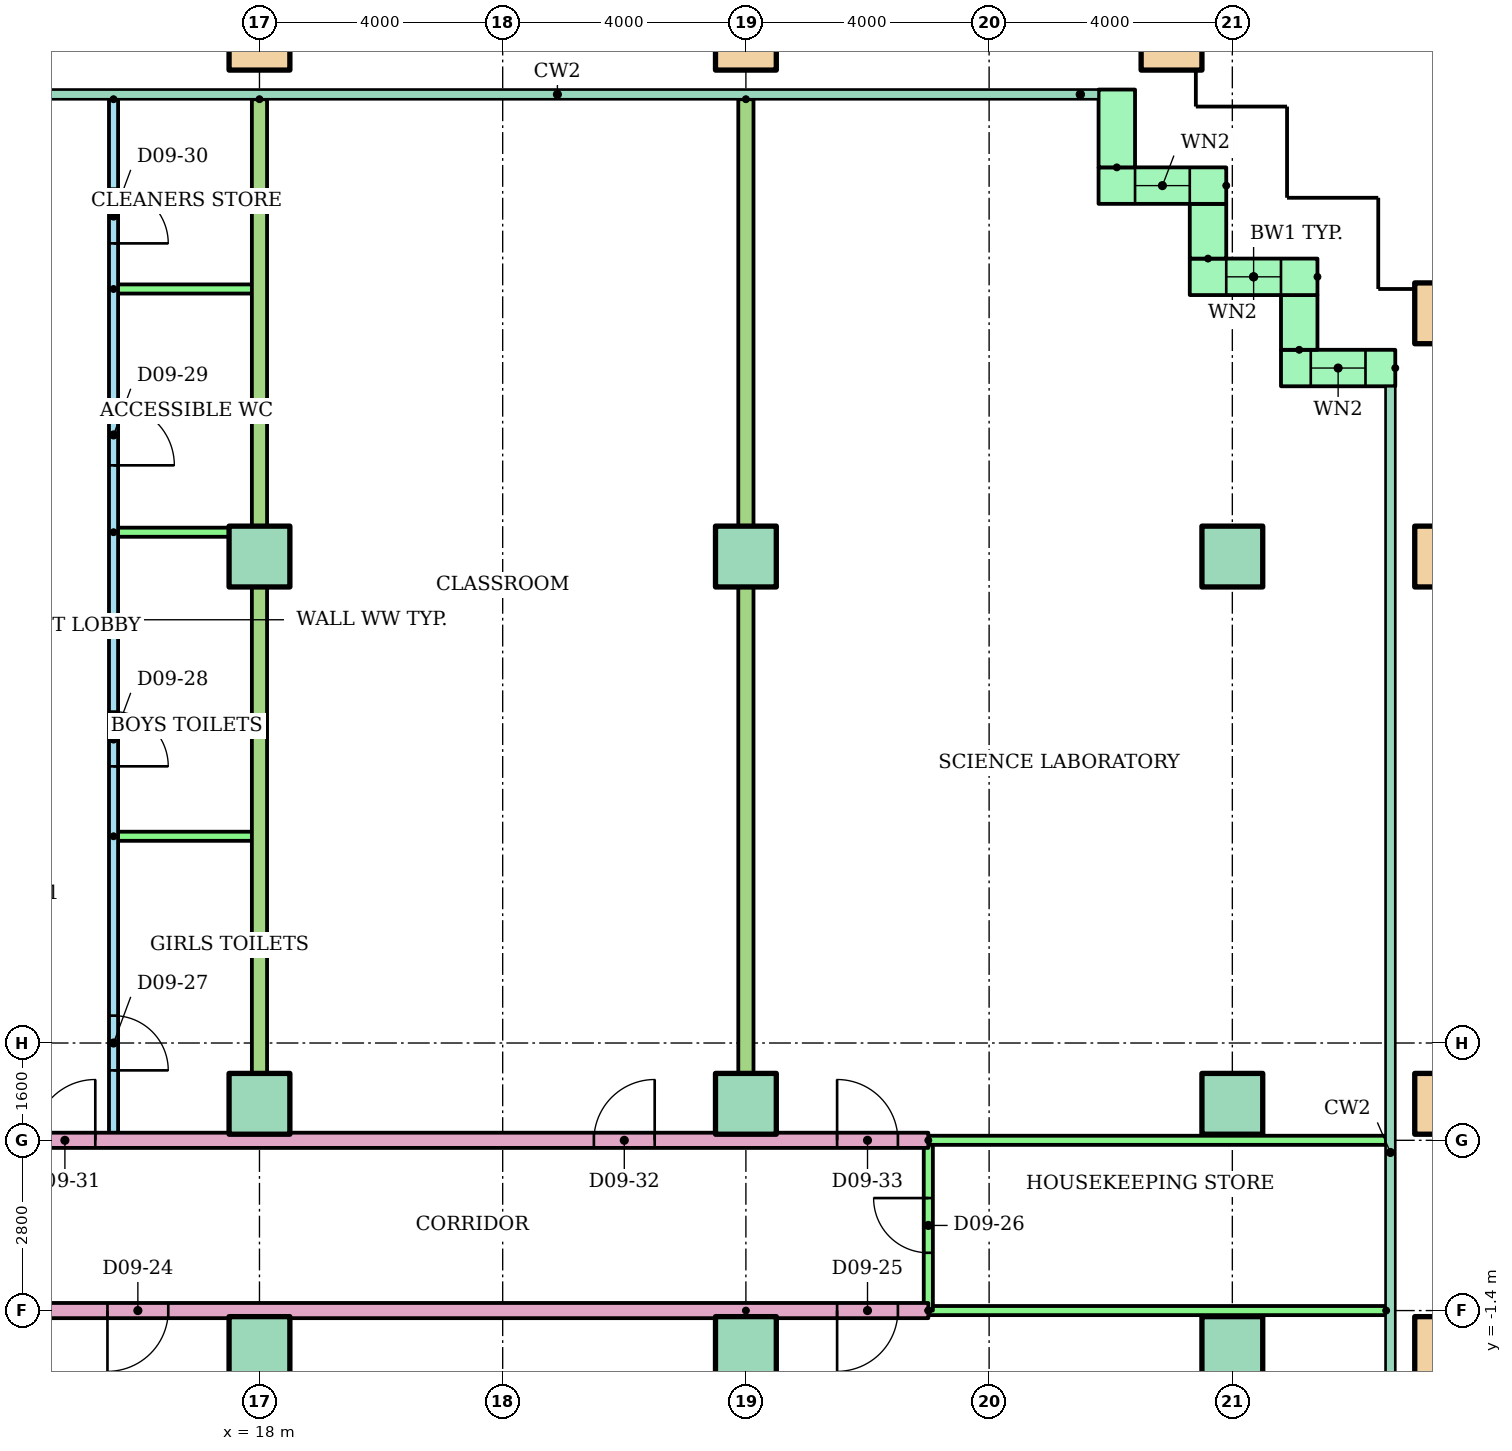
"""IFC4 building model, lengths in metres.
Left out: names, types, materials, properties, quantities, classifications, styles, units other than length and angle.
Written with IfcOpenShell. Run it as: python <this file> out.ifc"""

import sys

from ifc_helpers import new_model, si_unit, direction, frame, frame_2d, origin, origin_2d, place, context, subcontext, project, spatial, rectangle, hollow_rectangle, extrude, element, fill, save


model = new_model("IFC4")
c1 = context("Model", 3, precision=1e-05, world=origin(), true_north=direction((0.0, 1.0)))
c2 = subcontext(c1, "Body", "Model", "MODEL_VIEW")
j1 = project(units=[si_unit("LENGTHUNIT", "METRE"), si_unit("PLANEANGLEUNIT", "RADIAN")], contexts=[c1])
p1 = place(None, origin())
s1 = spatial("IfcSite", under=j1, at=p1, CompositionType="ELEMENT")
p2 = place(p1, origin())
s2 = spatial("IfcBuilding", under=s1, at=p2, CompositionType="ELEMENT")
p3 = place(p2, frame((0.0, 0.0, 37.7)))
s3 = spatial("IfcBuildingStorey", under=s2, at=p3, CompositionType="ELEMENT", Elevation=37.7)
for number, where in (
    (1, (18.0, -2.0, 0.0)),
    (2, (26.0, -2.0, 0.0)),
    (3, (34.0, -2.0, 0.0)),
):
    element("IfcColumn", number, at=place(p3, frame(where)), inside=s3, PredefinedType="COLUMN", context=c2, shape_type="SweptSolid", body=[
        extrude(rectangle(XDim=1.0, YDim=1.0, at=origin_2d()), origin(), (0.0, 0.0, 1.0), 3.9),
    ])
p4 = place(p3, frame((37.5, -2.0, 0.0)))
e4 = element("IfcColumn", 4, at=p4, inside=s3, PredefinedType="COLUMN", context=c2, shape_type="SweptSolid", body=[
    extrude(hollow_rectangle(XDim=1.0, YDim=1.0, WallThickness=0.05, at=origin_2d()), origin(), (0.0, 0.0, 1.0), 3.9),
])
for number, where in (
    (5, (18.0, 2.0, 0.0)),
    (6, (26.0, 2.0, 0.0)),
    (7, (34.0, 2.0, 0.0)),
):
    element("IfcColumn", number, at=place(p3, frame(where)), inside=s3, PredefinedType="COLUMN", context=c2, shape_type="SweptSolid", body=[
        extrude(rectangle(XDim=1.0, YDim=1.0, at=origin_2d()), origin(), (0.0, 0.0, 1.0), 3.9),
    ])
p5 = place(p3, frame((37.5, 2.0, 0.0)))
e8 = element("IfcColumn", 8, at=p5, inside=s3, PredefinedType="COLUMN", context=c2, shape_type="SweptSolid", body=[
    extrude(hollow_rectangle(XDim=1.0, YDim=1.0, WallThickness=0.05, at=origin_2d()), origin(), (0.0, 0.0, 1.0), 3.9),
])
for number, where in (
    (9, (18.0, 11.0, 0.0)),
    (10, (26.0, 11.0, 0.0)),
    (11, (34.0, 11.0, 0.0)),
):
    element("IfcColumn", number, at=place(p3, frame(where)), inside=s3, PredefinedType="COLUMN", context=c2, shape_type="SweptSolid", body=[
        extrude(rectangle(XDim=1.0, YDim=1.0, at=origin_2d()), origin(), (0.0, 0.0, 1.0), 3.9),
    ])
for number, where in (
    (12, (37.5, 11.0, 0.0)),
    (13, (37.5, 15.0, 0.0)),
    (14, (18.0, 19.5, 0.0)),
    (15, (26.0, 19.5, 0.0)),
    (16, (33.0, 19.5, 0.0)),
):
    element("IfcColumn", number, at=place(p3, frame(where)), inside=s3, PredefinedType="COLUMN", context=c2, shape_type="SweptSolid", body=[
        extrude(hollow_rectangle(XDim=1.0, YDim=1.0, WallThickness=0.05, at=origin_2d()), origin(), (0.0, 0.0, 1.0), 3.9),
    ])
p6 = place(p3, frame((36.68, 14.1, 0.0), z_axis=(0.0, 0.0, 1.0), x_axis=(-1.0, 0.0, 0.0)))
e17 = element("IfcWall", 17, at=p6, inside=s3, PredefinedType="STANDARD", context=c2, shape_type="SweptSolid", body=[
    extrude(rectangle(XDim=1.88, YDim=0.6, at=frame_2d((0.94, 0.0))), origin(), (0.0, 0.0, 1.0), 3.62),
])
p7 = place(p6, frame((0.49, 0.0, 0.9)))
e18 = element("IfcOpeningElement", 18, at=p7, cuts=e17, PredefinedType="OPENING", context=c2, shape_type="SweptSolid", body=[
    extrude(rectangle(XDim=0.9, YDim=1.8, at=frame_2d((0.45, 0.9))), frame((0.0, 0.31, 0.0), z_axis=(0.0, -1.0, 0.0), x_axis=(1.0, 0.0, 0.0)), (0.0, 0.0, 1.0), 0.62),
])
p8 = place(p3, frame((35.1, 14.4, 0.0), z_axis=(0.0, 0.0, 1.0), x_axis=(0.0, 1.0, 0.0)))
e19 = element("IfcWall", 19, at=p8, inside=s3, PredefinedType="STANDARD", context=c2, shape_type="SweptSolid", body=[
    extrude(rectangle(XDim=0.9, YDim=0.6, at=frame_2d((0.45, 0.0))), origin(), (0.0, 0.0, 1.0), 3.62),
])
p9 = place(p3, frame((35.4, 15.6, 0.0), z_axis=(0.0, 0.0, 1.0), x_axis=(-1.0, 0.0, 0.0)))
e20 = element("IfcWall", 20, at=p9, inside=s3, PredefinedType="STANDARD", context=c2, shape_type="SweptSolid", body=[
    extrude(rectangle(XDim=2.1, YDim=0.6, at=frame_2d((1.05, 0.0))), origin(), (0.0, 0.0, 1.0), 3.62),
])
p10 = place(p9, frame((0.6, 0.0, 0.9)))
e21 = element("IfcOpeningElement", 21, at=p10, cuts=e20, PredefinedType="OPENING", context=c2, shape_type="SweptSolid", body=[
    extrude(rectangle(XDim=0.9, YDim=1.8, at=frame_2d((0.45, 0.9))), frame((0.0, 0.31, 0.0), z_axis=(0.0, -1.0, 0.0), x_axis=(1.0, 0.0, 0.0)), (0.0, 0.0, 1.0), 0.62),
])
p11 = place(p3, frame((33.6, 15.9, 0.0), z_axis=(0.0, 0.0, 1.0), x_axis=(0.0, 1.0, 0.0)))
e22 = element("IfcWall", 22, at=p11, inside=s3, PredefinedType="STANDARD", context=c2, shape_type="SweptSolid", body=[
    extrude(rectangle(XDim=0.9, YDim=0.6, at=frame_2d((0.45, 0.0))), origin(), (0.0, 0.0, 1.0), 3.62),
])
p12 = place(p3, frame((33.9, 17.1, 0.0), z_axis=(0.0, 0.0, 1.0), x_axis=(-1.0, 0.0, 0.0)))
e23 = element("IfcWall", 23, at=p12, inside=s3, PredefinedType="STANDARD", context=c2, shape_type="SweptSolid", body=[
    extrude(rectangle(XDim=2.1, YDim=0.6, at=frame_2d((1.05, 0.0))), origin(), (0.0, 0.0, 1.0), 3.62),
])
p13 = place(p12, frame((0.6, 0.0, 0.9)))
e24 = element("IfcOpeningElement", 24, at=p13, cuts=e23, PredefinedType="OPENING", context=c2, shape_type="SweptSolid", body=[
    extrude(rectangle(XDim=0.9, YDim=1.8, at=frame_2d((0.45, 0.9))), frame((0.0, 0.31, 0.0), z_axis=(0.0, -1.0, 0.0), x_axis=(1.0, 0.0, 0.0)), (0.0, 0.0, 1.0), 0.62),
])
p14 = place(p3, frame((32.1, 17.4, 0.0), z_axis=(0.0, 0.0, 1.0), x_axis=(0.0, 1.0, 0.0)))
e25 = element("IfcWall", 25, at=p14, inside=s3, PredefinedType="STANDARD", context=c2, shape_type="SweptSolid", body=[
    extrude(rectangle(XDim=1.28, YDim=0.6, at=frame_2d((0.64, 0.0))), origin(), (0.0, 0.0, 1.0), 3.62),
])
p15 = place(p3, frame((29.0, -1.4, 0.0), z_axis=(0.0, 0.0, 1.0), x_axis=(-1.0, 0.0, 0.0)))
e26 = element("IfcWall", 26, at=p15, inside=s3, PredefinedType="PARTITIONING", context=c2, shape_type="SweptSolid", body=[
    extrude(rectangle(XDim=15.0, YDim=0.25, at=frame_2d((7.5, 0.0))), origin(), (0.0, 0.0, 1.0), 3.1),
])
p16 = place(p15, frame((12.5, 0.0, 0.0)))
e27 = element("IfcOpeningElement", 27, at=p16, cuts=e26, PredefinedType="OPENING", context=c2, shape_type="SweptSolid", body=[
    extrude(rectangle(XDim=1.0, YDim=2.1, at=frame_2d((0.5, 1.05))), frame((0.0, 0.135, 0.0), z_axis=(0.0, -1.0, 0.0), x_axis=(1.0, 0.0, 0.0)), (0.0, 0.0, 1.0), 0.27),
])
p17 = place(p15, frame((0.5, 0.0, 0.0)))
e28 = element("IfcOpeningElement", 28, at=p17, cuts=e26, PredefinedType="OPENING", context=c2, shape_type="SweptSolid", body=[
    extrude(rectangle(XDim=1.0, YDim=2.1, at=frame_2d((0.5, 1.05))), frame((0.0, 0.135, 0.0), z_axis=(0.0, -1.0, 0.0), x_axis=(1.0, 0.0, 0.0)), (0.0, 0.0, 1.0), 0.27),
])
p18 = place(p3, frame((36.53, -1.4, 0.0), z_axis=(0.0, 0.0, 1.0), x_axis=(-1.0, 0.0, 0.0)))
e29 = element("IfcWall", 29, at=p18, inside=s3, PredefinedType="PARTITIONING", context=c2, shape_type="SweptSolid", body=[
    extrude(rectangle(XDim=7.53, YDim=0.15, at=frame_2d((3.765, 0.0))), origin(), (0.0, 0.0, 1.0), 3.1),
])
p19 = place(p3, frame((29.0, -1.4, 0.0), z_axis=(0.0, 0.0, 1.0), x_axis=(0.0, 1.0, 0.0)))
e30 = element("IfcWall", 30, at=p19, inside=s3, PredefinedType="PARTITIONING", context=c2, shape_type="SweptSolid", body=[
    extrude(rectangle(XDim=2.8, YDim=0.15, at=frame_2d((1.4, 0.0))), origin(), (0.0, 0.0, 1.0), 3.1),
])
p20 = place(p19, frame((0.95, 0.0, 0.0)))
e31 = element("IfcOpeningElement", 31, at=p20, cuts=e30, PredefinedType="OPENING", context=c2, shape_type="SweptSolid", body=[
    extrude(rectangle(XDim=0.9, YDim=2.1, at=frame_2d((0.45, 1.05))), frame((0.0, 0.085, 0.0), z_axis=(0.0, -1.0, 0.0), x_axis=(1.0, 0.0, 0.0)), (0.0, 0.0, 1.0), 0.17),
])
p21 = place(p3, frame((26.0, -1.4, 0.0), z_axis=(0.0, 0.0, 1.0), x_axis=(0.0, -1.0, 0.0)))
e32 = element("IfcWall", 32, at=p21, inside=s3, PredefinedType="PARTITIONING", context=c2, shape_type="SweptSolid", body=[
    extrude(rectangle(XDim=14.721, YDim=0.25, at=frame_2d((7.361, 0.0))), origin(), (0.0, 0.0, 1.0), 3.1),
])
p22 = place(p3, frame((14.0, 1.4, 0.0)))
e33 = element("IfcWall", 33, at=p22, inside=s3, PredefinedType="PARTITIONING", context=c2, shape_type="SweptSolid", body=[
    extrude(rectangle(XDim=15.0, YDim=0.25, at=frame_2d((7.5, 0.0))), origin(), (0.0, 0.0, 1.0), 3.1),
])
p23 = place(p22, frame((0.3, 0.0, 0.0)))
e34 = element("IfcOpeningElement", 34, at=p23, cuts=e33, PredefinedType="OPENING", context=c2, shape_type="SweptSolid", body=[
    extrude(rectangle(XDim=1.0, YDim=2.1, at=frame_2d((0.5, 1.05))), frame((0.0, 0.135, 0.0), z_axis=(0.0, -1.0, 0.0), x_axis=(1.0, 0.0, 0.0)), (0.0, 0.0, 1.0), 0.27),
])
p24 = place(p22, frame((9.5, 0.0, 0.0)))
e35 = element("IfcOpeningElement", 35, at=p24, cuts=e33, PredefinedType="OPENING", context=c2, shape_type="SweptSolid", body=[
    extrude(rectangle(XDim=1.0, YDim=2.1, at=frame_2d((0.5, 1.05))), frame((0.0, 0.135, 0.0), z_axis=(0.0, -1.0, 0.0), x_axis=(1.0, 0.0, 0.0)), (0.0, 0.0, 1.0), 0.27),
])
p25 = place(p22, frame((13.5, 0.0, 0.0)))
e36 = element("IfcOpeningElement", 36, at=p25, cuts=e33, PredefinedType="OPENING", context=c2, shape_type="SweptSolid", body=[
    extrude(rectangle(XDim=1.0, YDim=2.1, at=frame_2d((0.5, 1.05))), frame((0.0, 0.135, 0.0), z_axis=(0.0, -1.0, 0.0), x_axis=(1.0, 0.0, 0.0)), (0.0, 0.0, 1.0), 0.27),
])
p26 = place(p3, frame((29.0, 1.4, 0.0)))
e37 = element("IfcWall", 37, at=p26, inside=s3, PredefinedType="PARTITIONING", context=c2, shape_type="SweptSolid", body=[
    extrude(rectangle(XDim=7.53, YDim=0.15, at=frame_2d((3.765, 0.0))), origin(), (0.0, 0.0, 1.0), 3.1),
])
p27 = place(p3, frame((15.6, 18.521, 0.0), z_axis=(0.0, 0.0, 1.0), x_axis=(0.0, -1.0, 0.0)))
e38 = element("IfcWall", 38, at=p27, inside=s3, PredefinedType="PARTITIONING", context=c2, shape_type="SweptSolid", body=[
    extrude(rectangle(XDim=17.121, YDim=0.15, at=frame_2d((8.561, 0.0))), origin(), (0.0, 0.0, 1.0), 3.1),
])
p28 = place(p27, frame((15.071, 0.0, 0.0)))
e39 = element("IfcOpeningElement", 39, at=p28, cuts=e38, PredefinedType="OPENING", context=c2, shape_type="SweptSolid", body=[
    extrude(rectangle(XDim=0.9, YDim=2.1, at=frame_2d((0.45, 1.05))), frame((0.0, 0.085, 0.0), z_axis=(0.0, -1.0, 0.0), x_axis=(1.0, 0.0, 0.0)), (0.0, 0.0, 1.0), 0.17),
])
p29 = place(p27, frame((10.071, 0.0, 0.0)))
e40 = element("IfcOpeningElement", 40, at=p29, cuts=e38, PredefinedType="OPENING", context=c2, shape_type="SweptSolid", body=[
    extrude(rectangle(XDim=0.9, YDim=2.1, at=frame_2d((0.45, 1.05))), frame((0.0, 0.085, 0.0), z_axis=(0.0, -1.0, 0.0), x_axis=(1.0, 0.0, 0.0)), (0.0, 0.0, 1.0), 0.17),
])
p30 = place(p27, frame((5.021, 0.0, 0.0)))
e41 = element("IfcOpeningElement", 41, at=p30, cuts=e38, PredefinedType="OPENING", context=c2, shape_type="SweptSolid", body=[
    extrude(rectangle(XDim=1.0, YDim=2.1, at=frame_2d((0.5, 1.05))), frame((0.0, 0.085, 0.0), z_axis=(0.0, -1.0, 0.0), x_axis=(1.0, 0.0, 0.0)), (0.0, 0.0, 1.0), 0.17),
])
p31 = place(p27, frame((1.471, 0.0, 0.0)))
e42 = element("IfcOpeningElement", 42, at=p31, cuts=e38, PredefinedType="OPENING", context=c2, shape_type="SweptSolid", body=[
    extrude(rectangle(XDim=0.9, YDim=2.1, at=frame_2d((0.45, 1.05))), frame((0.0, 0.085, 0.0), z_axis=(0.0, -1.0, 0.0), x_axis=(1.0, 0.0, 0.0)), (0.0, 0.0, 1.0), 0.17),
])
for number, where in (
    (43, (15.6, 6.4, 0.0)),
    (44, (15.6, 11.4, 0.0)),
    (45, (15.6, 15.4, 0.0)),
):
    element("IfcWall", number, at=place(p3, frame(where)), inside=s3, PredefinedType="PARTITIONING", context=c2, shape_type="SweptSolid", body=[
        extrude(rectangle(XDim=2.4, YDim=0.15, at=frame_2d((1.2, 0.0))), origin(), (0.0, 0.0, 1.0), 3.1),
    ])
for number, where, z_axis, x_axis in (
    (46, (18.0, 18.521, 0.0), (0.0, 0.0, 1.0), (0.0, -1.0, 0.0)),
    (47, (26.0, 18.521, 0.0), (0.0, 0.0, 1.0), (0.0, -1.0, 0.0)),
):
    element("IfcWall", number, at=place(p3, frame(where, z_axis=z_axis, x_axis=x_axis)), inside=s3, PredefinedType="PARTITIONING", context=c2, shape_type="SweptSolid", body=[
        extrude(rectangle(XDim=17.121, YDim=0.25, at=frame_2d((8.561, 0.0))), origin(), (0.0, 0.0, 1.0), 3.1),
    ])
p32 = place(p7, origin())
e48 = element("IfcWindow", 48, at=p32, inside=s3, PartitioningType="SINGLE_PANEL", PredefinedType="WINDOW", context=c2, shape_type="SweptSolid", body=[
    extrude(rectangle(XDim=0.9, YDim=1.8, at=frame_2d((0.45, 0.9))), frame((0.0, 0.03, 0.0), z_axis=(0.0, -1.0, 0.0), x_axis=(1.0, 0.0, 0.0)), (0.0, 0.0, 1.0), 0.06),
])
fill(e18, e48)
p33 = place(p10, origin())
e49 = element("IfcWindow", 49, at=p33, inside=s3, PartitioningType="SINGLE_PANEL", PredefinedType="WINDOW", context=c2, shape_type="SweptSolid", body=[
    extrude(rectangle(XDim=0.9, YDim=1.8, at=frame_2d((0.45, 0.9))), frame((0.0, 0.03, 0.0), z_axis=(0.0, -1.0, 0.0), x_axis=(1.0, 0.0, 0.0)), (0.0, 0.0, 1.0), 0.06),
])
fill(e21, e49)
p34 = place(p13, origin())
e50 = element("IfcWindow", 50, at=p34, inside=s3, PartitioningType="SINGLE_PANEL", PredefinedType="WINDOW", context=c2, shape_type="SweptSolid", body=[
    extrude(rectangle(XDim=0.9, YDim=1.8, at=frame_2d((0.45, 0.9))), frame((0.0, 0.03, 0.0), z_axis=(0.0, -1.0, 0.0), x_axis=(1.0, 0.0, 0.0)), (0.0, 0.0, 1.0), 0.06),
])
fill(e24, e50)
p35 = place(p16, origin())
e51 = element("IfcDoor", 51, at=p35, inside=s3, OperationType="SINGLE_SWING_RIGHT", PredefinedType="DOOR", context=c2, shape_type="SweptSolid", body=[
    extrude(rectangle(XDim=1.0, YDim=2.1, at=frame_2d((0.5, 1.05))), frame((0.0, 0.025, 0.0), z_axis=(0.0, -1.0, 0.0), x_axis=(1.0, 0.0, 0.0)), (0.0, 0.0, 1.0), 0.05),
])
fill(e27, e51)
p36 = place(p17, origin())
e52 = element("IfcDoor", 52, at=p36, inside=s3, OperationType="SINGLE_SWING_RIGHT", PredefinedType="DOOR", context=c2, shape_type="SweptSolid", body=[
    extrude(rectangle(XDim=1.0, YDim=2.1, at=frame_2d((0.5, 1.05))), frame((0.0, 0.025, 0.0), z_axis=(0.0, -1.0, 0.0), x_axis=(1.0, 0.0, 0.0)), (0.0, 0.0, 1.0), 0.05),
])
fill(e28, e52)
p37 = place(p20, origin())
e53 = element("IfcDoor", 53, at=p37, inside=s3, OperationType="SINGLE_SWING_RIGHT", PredefinedType="DOOR", context=c2, shape_type="SweptSolid", body=[
    extrude(rectangle(XDim=0.9, YDim=2.1, at=frame_2d((0.45, 1.05))), frame((0.0, 0.025, 0.0), z_axis=(0.0, -1.0, 0.0), x_axis=(1.0, 0.0, 0.0)), (0.0, 0.0, 1.0), 0.05),
])
fill(e31, e53)
p38 = place(p28, origin())
e54 = element("IfcDoor", 54, at=p38, inside=s3, OperationType="SINGLE_SWING_RIGHT", PredefinedType="DOOR", context=c2, shape_type="SweptSolid", body=[
    extrude(rectangle(XDim=0.9, YDim=2.1, at=frame_2d((0.45, 1.05))), frame((0.0, 0.025, 0.0), z_axis=(0.0, -1.0, 0.0), x_axis=(1.0, 0.0, 0.0)), (0.0, 0.0, 1.0), 0.05),
])
fill(e39, e54)
p39 = place(p29, origin())
e55 = element("IfcDoor", 55, at=p39, inside=s3, OperationType="SINGLE_SWING_RIGHT", PredefinedType="DOOR", context=c2, shape_type="SweptSolid", body=[
    extrude(rectangle(XDim=0.9, YDim=2.1, at=frame_2d((0.45, 1.05))), frame((0.0, 0.025, 0.0), z_axis=(0.0, -1.0, 0.0), x_axis=(1.0, 0.0, 0.0)), (0.0, 0.0, 1.0), 0.05),
])
fill(e40, e55)
p40 = place(p30, origin())
e56 = element("IfcDoor", 56, at=p40, inside=s3, OperationType="SINGLE_SWING_RIGHT", PredefinedType="DOOR", context=c2, shape_type="SweptSolid", body=[
    extrude(rectangle(XDim=1.0, YDim=2.1, at=frame_2d((0.5, 1.05))), frame((0.0, 0.025, 0.0), z_axis=(0.0, -1.0, 0.0), x_axis=(1.0, 0.0, 0.0)), (0.0, 0.0, 1.0), 0.05),
])
fill(e41, e56)
p41 = place(p31, origin())
e57 = element("IfcDoor", 57, at=p41, inside=s3, OperationType="SINGLE_SWING_RIGHT", PredefinedType="DOOR", context=c2, shape_type="SweptSolid", body=[
    extrude(rectangle(XDim=0.9, YDim=2.1, at=frame_2d((0.45, 1.05))), frame((0.0, 0.025, 0.0), z_axis=(0.0, -1.0, 0.0), x_axis=(1.0, 0.0, 0.0)), (0.0, 0.0, 1.0), 0.05),
])
fill(e42, e57)
p42 = place(p23, origin())
e58 = element("IfcDoor", 58, at=p42, inside=s3, OperationType="SINGLE_SWING_RIGHT", PredefinedType="DOOR", context=c2, shape_type="SweptSolid", body=[
    extrude(rectangle(XDim=1.0, YDim=2.1, at=frame_2d((0.5, 1.05))), frame((0.0, 0.025, 0.0), z_axis=(0.0, -1.0, 0.0), x_axis=(1.0, 0.0, 0.0)), (0.0, 0.0, 1.0), 0.05),
])
fill(e34, e58)
p43 = place(p24, origin())
e59 = element("IfcDoor", 59, at=p43, inside=s3, OperationType="SINGLE_SWING_RIGHT", PredefinedType="DOOR", context=c2, shape_type="SweptSolid", body=[
    extrude(rectangle(XDim=1.0, YDim=2.1, at=frame_2d((0.5, 1.05))), frame((0.0, 0.025, 0.0), z_axis=(0.0, -1.0, 0.0), x_axis=(1.0, 0.0, 0.0)), (0.0, 0.0, 1.0), 0.05),
])
fill(e35, e59)
p44 = place(p25, origin())
e60 = element("IfcDoor", 60, at=p44, inside=s3, OperationType="SINGLE_SWING_LEFT", PredefinedType="DOOR", context=c2, shape_type="SweptSolid", body=[
    extrude(rectangle(XDim=1.0, YDim=2.1, at=frame_2d((0.5, 1.05))), frame((0.0, 0.025, 0.0), z_axis=(0.0, -1.0, 0.0), x_axis=(1.0, 0.0, 0.0)), (0.0, 0.0, 1.0), 0.05),
])
fill(e36, e60)
save(model, sys.argv[1])
